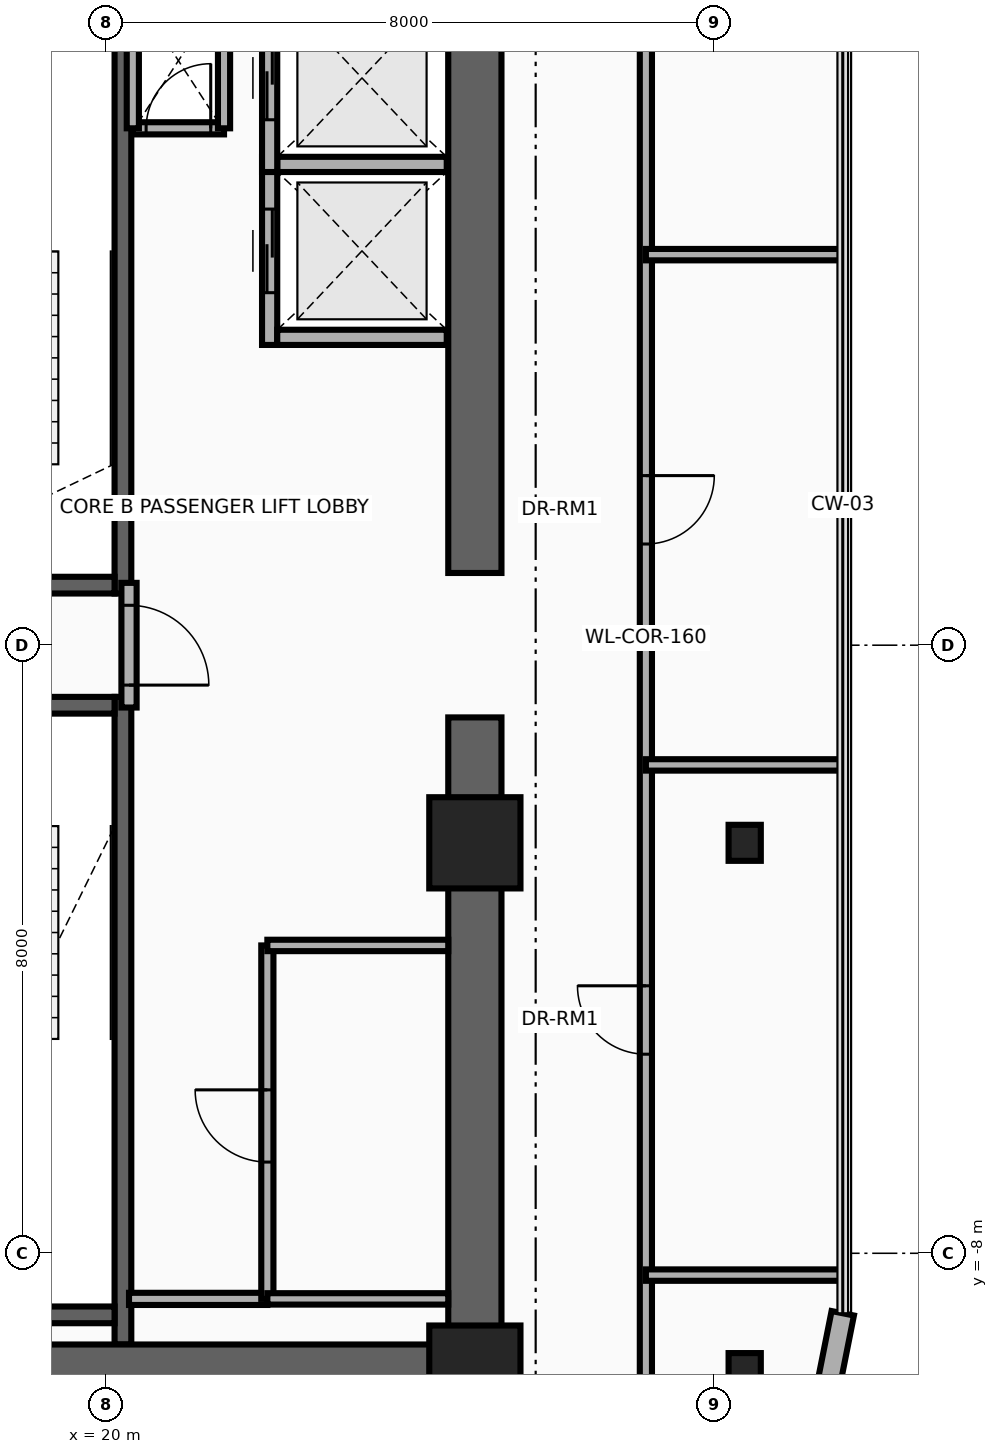
"""IFC4 building model, lengths in metres.
Left out: names, types, materials, properties, quantities, classifications, styles, units other than length and angle.
Written with IfcOpenShell. Run it as: python <this file> out.ifc"""

import sys

from ifc_helpers import new_model, si_unit, direction, frame, frame_2d, origin, origin_2d, place, context, subcontext, project, spatial, rectangle, i_section, extrude, source, transform, mapped, element, fill, save


model = new_model("IFC4")
c1 = context("Model", 3, precision=1e-05, world=origin(), true_north=direction((0.0, 1.0)))
c2 = subcontext(c1, "Body", "Model", "MODEL_VIEW")
j1 = project(units=[si_unit("LENGTHUNIT", "METRE"), si_unit("PLANEANGLEUNIT", "RADIAN")], contexts=[c1])
p1 = place(None, origin())
s1 = spatial("IfcSite", under=j1, at=p1, CompositionType="ELEMENT")
p2 = place(p1, origin())
s2 = spatial("IfcBuilding", under=s1, at=p2, CompositionType="ELEMENT")
p3 = place(p2, frame((0.0, 0.0, 113.1)))
s3 = spatial("IfcBuildingStorey", under=s2, at=p3, CompositionType="ELEMENT", Elevation=113.1)
p4 = place(p3, frame((20.22, 0.68, 0.0), z_axis=(0.0, 0.0, 1.0), x_axis=(0.0, 1.0, 0.0)))
e1 = element("IfcWall", 1, at=p4, inside=s3, PredefinedType="SHEAR", context=c2, shape_type="SweptSolid", body=[
    extrude(rectangle(XDim=8.52, YDim=0.22, at=frame_2d((4.26, 0.0))), origin(), (0.0, 0.0, 1.0), 3.46),
])
p5 = place(p3, frame((17.0, 0.79, 0.0), z_axis=(0.0, 0.0, 1.0), x_axis=(1.0, 0.0, 0.0)))
e2 = element("IfcWall", 2, at=p5, inside=s3, PredefinedType="SHEAR", context=c2, shape_type="SweptSolid", body=[
    extrude(rectangle(XDim=3.11, YDim=0.22, at=frame_2d((1.555, 0.0))), origin(), (0.0, 0.0, 1.0), 3.46),
])
p6 = place(p5, frame((0.95, 0.0, 0.0)))
e3 = element("IfcOpeningElement", 3, at=p6, cuts=e2, PredefinedType="OPENING", context=c2, shape_type="SweptSolid", body=[
    extrude(rectangle(XDim=1.1, YDim=2.15, at=frame_2d((0.55, 1.075))), frame((0.0, 0.125, 0.0), z_axis=(0.0, -1.0, 0.0), x_axis=(1.0, 0.0, 0.0)), (0.0, 0.0, 1.0), 0.25),
])
p7 = place(p3, frame((20.22, -9.2, 0.0), z_axis=(0.0, 0.0, 1.0), x_axis=(0.0, 1.0, 0.0)))
e4 = element("IfcWall", 4, at=p7, inside=s3, PredefinedType="SHEAR", context=c2, shape_type="SweptSolid", body=[
    extrude(rectangle(XDim=8.52, YDim=0.22, at=frame_2d((4.26, 0.0))), origin(), (0.0, 0.0, 1.0), 3.46),
])
p8 = place(p3, frame((17.0, -8.81, 0.0), z_axis=(0.0, 0.0, 1.0), x_axis=(1.0, 0.0, 0.0)))
e5 = element("IfcWall", 5, at=p8, inside=s3, PredefinedType="SHEAR", context=c2, shape_type="SweptSolid", body=[
    extrude(rectangle(XDim=3.11, YDim=0.22, at=frame_2d((1.555, 0.0))), origin(), (0.0, 0.0, 1.0), 3.46),
])
p9 = place(p3, frame((17.0, -0.79, 0.0), z_axis=(0.0, 0.0, 1.0), x_axis=(1.0, 0.0, 0.0)))
e6 = element("IfcWall", 6, at=p9, inside=s3, PredefinedType="SHEAR", context=c2, shape_type="SweptSolid", body=[
    extrude(rectangle(XDim=3.11, YDim=0.22, at=frame_2d((1.555, 0.0))), origin(), (0.0, 0.0, 1.0), 3.46),
])
p10 = place(p9, frame((0.95, 0.0, 0.0)))
e7 = element("IfcOpeningElement", 7, at=p10, cuts=e6, PredefinedType="OPENING", context=c2, shape_type="SweptSolid", body=[
    extrude(rectangle(XDim=1.1, YDim=2.15, at=frame_2d((0.55, 1.075))), frame((0.0, 0.125, 0.0), z_axis=(0.0, -1.0, 0.0), x_axis=(1.0, 0.0, 0.0)), (0.0, 0.0, 1.0), 0.25),
])
for number, where, z_axis, x_axis in (
    (8, (24.85, -9.9, 0.0), (0.0, 0.0, 1.0), (0.0, 1.0, 0.0)),
    (9, (24.85, 0.95, 0.0), (0.0, 0.0, 1.0), (0.0, 1.0, 0.0)),
):
    element("IfcWall", number, at=place(p3, frame(where, z_axis=z_axis, x_axis=x_axis)), inside=s3, PredefinedType="SHEAR", context=c2, shape_type="SweptSolid", body=[
        extrude(rectangle(XDim=8.95, YDim=0.7, at=frame_2d((4.475, 0.0))), origin(), (0.0, 0.0, 1.0), 3.46),
    ])
p11 = place(p3, frame((15.85, -9.55, 0.0), z_axis=(0.0, 0.0, 1.0), x_axis=(1.0, 0.0, 0.0)))
e10 = element("IfcWall", 10, at=p11, inside=s3, PredefinedType="SHEAR", context=c2, shape_type="SweptSolid", body=[
    extrude(rectangle(XDim=9.0, YDim=0.7, at=frame_2d((4.5, 0.0))), origin(), (0.0, 0.0, 1.0), 3.46),
])
m1 = source(origin(), c2, "Body", "SweptSolid", [
    extrude(rectangle(XDim=1.2, YDim=1.2, at=origin_2d()), origin(), (0.0, 0.0, 1.0), 3.7),
])
p12 = place(p3, frame((24.85, -9.55, 0.0), z_axis=(0.0, 0.0, 1.0), x_axis=(1.0, 0.0, 0.0)))
e11 = element("IfcColumn", 11, at=p12, inside=s3, PredefinedType="COLUMN", context=c2, shape_type="MappedRepresentation", body=[
    mapped(m1, transform((0.0, 0.0, 0.0), x_axis=(1.0, 0.0, 0.0), y_axis=(0.0, 1.0, 0.0), z_axis=(0.0, 0.0, 1.0), scale=1.0)),
])
m2 = source(origin(), c2, "Body", "SweptSolid", [
    extrude(i_section(OverallWidth=0.424, OverallDepth=0.474, WebThickness=0.048, FlangeThickness=0.077, at=origin_2d()), origin(), (0.0, 0.0, 1.0), 3.7),
])
p13 = place(p3, frame((28.4, -9.55, 0.0), z_axis=(0.0, 0.0, 1.0), x_axis=(1.0, 0.0, 0.0)))
e12 = element("IfcColumn", 12, at=p13, inside=s3, PredefinedType="COLUMN", context=c2, shape_type="MappedRepresentation", body=[
    mapped(m2, transform((0.0, 0.0, 0.0), x_axis=(1.0, 0.0, 0.0), y_axis=(0.0, 1.0, 0.0), z_axis=(0.0, 0.0, 1.0), scale=1.0)),
])
p14 = place(p3, frame((24.85, -2.6, 0.0), z_axis=(0.0, 0.0, 1.0), x_axis=(1.0, 0.0, 0.0)))
e13 = element("IfcColumn", 13, at=p14, inside=s3, PredefinedType="COLUMN", context=c2, shape_type="MappedRepresentation", body=[
    mapped(m1, transform((0.0, 0.0, 0.0), x_axis=(1.0, 0.0, 0.0), y_axis=(0.0, 1.0, 0.0), z_axis=(0.0, 0.0, 1.0), scale=1.0)),
])
p15 = place(p3, frame((28.4, -2.6, 0.0), z_axis=(0.0, 0.0, 1.0), x_axis=(1.0, 0.0, 0.0)))
e14 = element("IfcColumn", 14, at=p15, inside=s3, PredefinedType="COLUMN", context=c2, shape_type="MappedRepresentation", body=[
    mapped(m2, transform((0.0, 0.0, 0.0), x_axis=(1.0, 0.0, 0.0), y_axis=(0.0, 1.0, 0.0), z_axis=(0.0, 0.0, 1.0), scale=1.0)),
])
p16 = place(p3, frame((29.69, -8.789, 0.0), z_axis=(0.0, 0.0, 1.0), x_axis=(-0.194996050505, -0.980804027463, 0.0)))
e15 = element("IfcWall", 15, at=p16, inside=s3, PredefinedType="SOLIDWALL", context=c2, shape_type="SweptSolid", body=[
    extrude(rectangle(XDim=1.216, YDim=0.3, at=frame_2d((0.608, 0.0))), origin(), (0.0, 0.0, 1.0), 3.46),
])
p17 = place(p3, frame((22.15, 3.95, 0.0), z_axis=(0.0, 0.0, 1.0), x_axis=(0.0, 1.0, 0.0)))
e16 = element("IfcWall", 16, at=p17, inside=s3, PredefinedType="MOVABLE", context=c2, shape_type="SweptSolid", body=[
    extrude(rectangle(XDim=2.475, YDim=0.2, at=frame_2d((1.238, 0.0))), origin(), (0.0, 0.0, 1.0), 3.46),
])
p18 = place(p17, frame((0.688, 0.0, 0.0)))
e17 = element("IfcOpeningElement", 17, at=p18, cuts=e16, PredefinedType="OPENING", context=c2, shape_type="SweptSolid", body=[
    extrude(rectangle(XDim=1.1, YDim=2.1, at=frame_2d((0.55, 1.05))), frame((0.0, 0.115, 0.0), z_axis=(0.0, -1.0, 0.0), x_axis=(1.0, 0.0, 0.0)), (0.0, 0.0, 1.0), 0.23),
])
for number, where, z_axis, x_axis in (
    (18, (22.25, 4.05, 0.0), (0.0, 0.0, 1.0), (1.0, 0.0, 0.0)),
    (19, (22.25, 6.325, 0.0), (0.0, 0.0, 1.0), (1.0, 0.0, 0.0)),
):
    element("IfcWall", number, at=place(p3, frame(where, z_axis=z_axis, x_axis=x_axis)), inside=s3, PredefinedType="MOVABLE", context=c2, shape_type="SweptSolid", body=[
        extrude(rectangle(XDim=2.23, YDim=0.2, at=frame_2d((1.115, 0.0))), origin(), (0.0, 0.0, 1.0), 2.245),
    ])
p19 = place(p3, frame((22.15, 6.225, 0.0), z_axis=(0.0, 0.0, 1.0), x_axis=(0.0, 1.0, 0.0)))
e20 = element("IfcWall", 20, at=p19, inside=s3, PredefinedType="MOVABLE", context=c2, shape_type="SweptSolid", body=[
    extrude(rectangle(XDim=2.475, YDim=0.2, at=frame_2d((1.237, 0.0))), origin(), (0.0, 0.0, 1.0), 3.46),
])
p20 = place(p19, frame((0.688, 0.0, 0.0)))
e21 = element("IfcOpeningElement", 21, at=p20, cuts=e20, PredefinedType="OPENING", context=c2, shape_type="SweptSolid", body=[
    extrude(rectangle(XDim=1.1, YDim=2.1, at=frame_2d((0.55, 1.05))), frame((0.0, 0.115, 0.0), z_axis=(0.0, -1.0, 0.0), x_axis=(1.0, 0.0, 0.0)), (0.0, 0.0, 1.0), 0.23),
])
p21 = place(p3, frame((20.3, -0.82, 0.0), z_axis=(0.0, 0.0, 1.0), x_axis=(0.0, 1.0, 0.0)))
e22 = element("IfcWall", 22, at=p21, inside=s3, PredefinedType="PARTITIONING", context=c2, shape_type="SweptSolid", body=[
    extrude(rectangle(XDim=1.64, YDim=0.2, at=frame_2d((0.82, 0.0))), origin(), (0.0, 0.0, 1.0), 3.46),
])
p22 = place(p21, frame((0.295, 0.0, 0.0)))
e23 = element("IfcOpeningElement", 23, at=p22, cuts=e22, PredefinedType="OPENING", context=c2, shape_type="SweptSolid", body=[
    extrude(rectangle(XDim=1.05, YDim=2.15, at=frame_2d((0.525, 1.075))), frame((0.0, 0.115, 0.0), z_axis=(0.0, -1.0, 0.0), x_axis=(1.0, 0.0, 0.0)), (0.0, 0.0, 1.0), 0.23),
])
p23 = place(p3, frame((20.35, 6.8, 0.0), z_axis=(0.0, 0.0, 1.0), x_axis=(1.0, 0.0, 0.0)))
e24 = element("IfcWall", 24, at=p23, inside=s3, PredefinedType="PARTITIONING", context=c2, shape_type="SweptSolid", body=[
    extrude(rectangle(XDim=1.2, YDim=0.16, at=frame_2d((0.6, 0.0))), origin(), (0.0, 0.0, 1.0), 3.46),
])
p24 = place(p23, frame((0.175, 0.0, 0.0)))
e25 = element("IfcOpeningElement", 25, at=p24, cuts=e24, PredefinedType="OPENING", context=c2, shape_type="SweptSolid", body=[
    extrude(rectangle(XDim=0.85, YDim=2.05, at=frame_2d((0.425, 1.025))), frame((0.0, 0.095, 0.0), z_axis=(0.0, -1.0, 0.0), x_axis=(1.0, 0.0, 0.0)), (0.0, 0.0, 1.0), 0.19),
])
for number, where, z_axis, x_axis in (
    (26, (21.55, 6.8, 0.0), (0.0, 0.0, 1.0), (0.0, 1.0, 0.0)),
    (27, (20.35, 6.8, 0.0), (0.0, 0.0, 1.0), (0.0, 1.0, 0.0)),
):
    element("IfcWall", number, at=place(p3, frame(where, z_axis=z_axis, x_axis=x_axis)), inside=s3, PredefinedType="PARTITIONING", context=c2, shape_type="SweptSolid", body=[
        extrude(rectangle(XDim=1.8, YDim=0.16, at=frame_2d((0.9, 0.0))), origin(), (0.0, 0.0, 1.0), 3.46),
    ])
p25 = place(p3, frame((20.3, -8.6, 0.0), z_axis=(0.0, 0.0, 1.0), x_axis=(1.0, 0.0, 0.0)))
e28 = element("IfcWall", 28, at=p25, inside=s3, PredefinedType="PARTITIONING", context=c2, shape_type="SweptSolid", body=[
    extrude(rectangle(XDim=1.82, YDim=0.16, at=frame_2d((0.91, 0.0))), origin(), (0.0, 0.0, 1.0), 3.46),
])
p26 = place(p3, frame((22.12, -8.6, 0.0), z_axis=(0.0, 0.0, 1.0), x_axis=(0.0, 1.0, 0.0)))
e29 = element("IfcWall", 29, at=p26, inside=s3, PredefinedType="PARTITIONING", context=c2, shape_type="SweptSolid", body=[
    extrude(rectangle(XDim=4.65, YDim=0.16, at=frame_2d((2.325, 0.0))), origin(), (0.0, 0.0, 1.0), 3.46),
])
p27 = place(p26, frame((1.8, 0.0, 0.0)))
e30 = element("IfcOpeningElement", 30, at=p27, cuts=e29, PredefinedType="OPENING", context=c2, shape_type="SweptSolid", body=[
    extrude(rectangle(XDim=0.95, YDim=2.15, at=frame_2d((0.475, 1.075))), frame((0.0, 0.095, 0.0), z_axis=(0.0, -1.0, 0.0), x_axis=(1.0, 0.0, 0.0)), (0.0, 0.0, 1.0), 0.19),
])
for number, where, z_axis, x_axis in (
    (31, (22.12, -3.95, 0.0), (0.0, 0.0, 1.0), (1.0, 0.0, 0.0)),
    (32, (22.12, -8.6, 0.0), (0.0, 0.0, 1.0), (1.0, 0.0, 0.0)),
):
    element("IfcWall", number, at=place(p3, frame(where, z_axis=z_axis, x_axis=x_axis)), inside=s3, PredefinedType="PARTITIONING", context=c2, shape_type="SweptSolid", body=[
        extrude(rectangle(XDim=2.38, YDim=0.15, at=frame_2d((1.19, 0.0))), origin(), (0.0, 0.0, 1.0), 3.46),
    ])
p28 = place(p3, frame((27.1, -11.661, 0.0), z_axis=(0.0, 0.0, 1.0), x_axis=(0.0, 1.0, 0.0)))
e33 = element("IfcWall", 33, at=p28, inside=s3, PredefinedType="PARTITIONING", context=c2, shape_type="SweptSolid", body=[
    extrude(rectangle(XDim=23.511, YDim=0.16, at=frame_2d((11.755, 0.0))), origin(), (0.0, 0.0, 1.0), 2.666),
])
p29 = place(p28, frame((0.8, 0.0, 0.0)))
e34 = element("IfcOpeningElement", 34, at=p29, cuts=e33, PredefinedType="OPENING", context=c2, shape_type="SweptSolid", body=[
    extrude(rectangle(XDim=0.9, YDim=2.1, at=frame_2d((0.45, 1.05))), frame((0.0, 0.095, 0.0), z_axis=(0.0, -1.0, 0.0), x_axis=(1.0, 0.0, 0.0)), (0.0, 0.0, 1.0), 0.19),
])
p30 = place(p28, frame((6.28, 0.0, 0.0)))
e35 = element("IfcOpeningElement", 35, at=p30, cuts=e33, PredefinedType="OPENING", context=c2, shape_type="SweptSolid", body=[
    extrude(rectangle(XDim=0.9, YDim=2.1, at=frame_2d((0.45, 1.05))), frame((0.0, 0.095, 0.0), z_axis=(0.0, -1.0, 0.0), x_axis=(1.0, 0.0, 0.0)), (0.0, 0.0, 1.0), 0.19),
])
p31 = place(p28, frame((12.992, 0.0, 0.0)))
e36 = element("IfcOpeningElement", 36, at=p31, cuts=e33, PredefinedType="OPENING", context=c2, shape_type="SweptSolid", body=[
    extrude(rectangle(XDim=0.9, YDim=2.1, at=frame_2d((0.45, 1.05))), frame((0.0, 0.095, 0.0), z_axis=(0.0, -1.0, 0.0), x_axis=(1.0, 0.0, 0.0)), (0.0, 0.0, 1.0), 0.19),
])
p32 = place(p28, frame((19.705, 0.0, 0.0)))
e37 = element("IfcOpeningElement", 37, at=p32, cuts=e33, PredefinedType="OPENING", context=c2, shape_type="SweptSolid", body=[
    extrude(rectangle(XDim=0.9, YDim=2.1, at=frame_2d((0.45, 1.05))), frame((0.0, 0.095, 0.0), z_axis=(0.0, -1.0, 0.0), x_axis=(1.0, 0.0, 0.0)), (0.0, 0.0, 1.0), 0.19),
])
for number, where, z_axis, x_axis in (
    (38, (27.1, -8.287, 0.0), (0.0, 0.0, 1.0), (1.0, 0.0, 0.0)),
    (39, (27.1, -1.575, 0.0), (0.0, 0.0, 1.0), (1.0, 0.0, 0.0)),
    (40, (27.1, 5.138, 0.0), (0.0, 0.0, 1.0), (1.0, 0.0, 0.0)),
):
    element("IfcWall", number, at=place(p3, frame(where, z_axis=z_axis, x_axis=x_axis)), inside=s3, PredefinedType="PARTITIONING", context=c2, shape_type="SweptSolid", body=[
        extrude(rectangle(XDim=2.59, YDim=0.15, at=frame_2d((1.295, 0.0))), origin(), (0.0, 0.0, 1.0), 2.896),
    ])
p33 = place(p18, origin())
e41 = element("IfcDoor", 41, at=p33, inside=s3, OperationType="DOUBLE_DOOR_SLIDING", PredefinedType="DOOR", context=c2, shape_type="SweptSolid", body=[
    extrude(rectangle(XDim=1.1, YDim=2.1, at=frame_2d((0.55, 1.05))), frame((0.0, 0.025, 0.0), z_axis=(0.0, -1.0, 0.0), x_axis=(1.0, 0.0, 0.0)), (0.0, 0.0, 1.0), 0.05),
])
fill(e17, e41)
p34 = place(p20, origin())
e42 = element("IfcDoor", 42, at=p34, inside=s3, OperationType="DOUBLE_DOOR_SLIDING", PredefinedType="DOOR", context=c2, shape_type="SweptSolid", body=[
    extrude(rectangle(XDim=1.1, YDim=2.1, at=frame_2d((0.55, 1.05))), frame((0.0, 0.025, 0.0), z_axis=(0.0, -1.0, 0.0), x_axis=(1.0, 0.0, 0.0)), (0.0, 0.0, 1.0), 0.05),
])
fill(e21, e42)
p35 = place(p22, frame((1.05, 0.0, 0.0), z_axis=(0.0, 0.0, 1.0), x_axis=(-1.0, 0.0, 0.0)))
e43 = element("IfcDoor", 43, at=p35, inside=s3, OperationType="SINGLE_SWING_LEFT", PredefinedType="DOOR", context=c2, shape_type="SweptSolid", body=[
    extrude(rectangle(XDim=1.05, YDim=2.15, at=frame_2d((0.525, 1.075))), frame((0.0, 0.025, 0.0), z_axis=(0.0, -1.0, 0.0), x_axis=(1.0, 0.0, 0.0)), (0.0, 0.0, 1.0), 0.05),
])
fill(e23, e43)
p36 = place(p24, origin())
e44 = element("IfcDoor", 44, at=p36, inside=s3, OperationType="SINGLE_SWING_RIGHT", PredefinedType="DOOR", context=c2, shape_type="SweptSolid", body=[
    extrude(rectangle(XDim=0.85, YDim=2.05, at=frame_2d((0.425, 1.025))), frame((0.0, 0.025, 0.0), z_axis=(0.0, -1.0, 0.0), x_axis=(1.0, 0.0, 0.0)), (0.0, 0.0, 1.0), 0.05),
])
fill(e25, e44)
p37 = place(p27, origin())
e45 = element("IfcDoor", 45, at=p37, inside=s3, OperationType="SINGLE_SWING_LEFT", PredefinedType="DOOR", context=c2, shape_type="SweptSolid", body=[
    extrude(rectangle(XDim=0.95, YDim=2.15, at=frame_2d((0.475, 1.075))), frame((0.0, 0.025, 0.0), z_axis=(0.0, -1.0, 0.0), x_axis=(1.0, 0.0, 0.0)), (0.0, 0.0, 1.0), 0.05),
])
fill(e30, e45)
p38 = place(p30, origin())
e46 = element("IfcDoor", 46, at=p38, inside=s3, OperationType="SINGLE_SWING_RIGHT", PredefinedType="DOOR", context=c2, shape_type="SweptSolid", body=[
    extrude(rectangle(XDim=0.9, YDim=2.1, at=frame_2d((0.45, 1.05))), frame((0.0, 0.025, 0.0), z_axis=(0.0, -1.0, 0.0), x_axis=(1.0, 0.0, 0.0)), (0.0, 0.0, 1.0), 0.05),
])
fill(e35, e46)
p39 = place(p31, frame((0.9, 0.0, 0.0), z_axis=(0.0, 0.0, 1.0), x_axis=(-1.0, 0.0, 0.0)))
e47 = element("IfcDoor", 47, at=p39, inside=s3, OperationType="SINGLE_SWING_LEFT", PredefinedType="DOOR", context=c2, shape_type="SweptSolid", body=[
    extrude(rectangle(XDim=0.9, YDim=2.1, at=frame_2d((0.45, 1.05))), frame((0.0, 0.025, 0.0), z_axis=(0.0, -1.0, 0.0), x_axis=(1.0, 0.0, 0.0)), (0.0, 0.0, 1.0), 0.05),
])
fill(e36, e47)
save(model, sys.argv[1])
